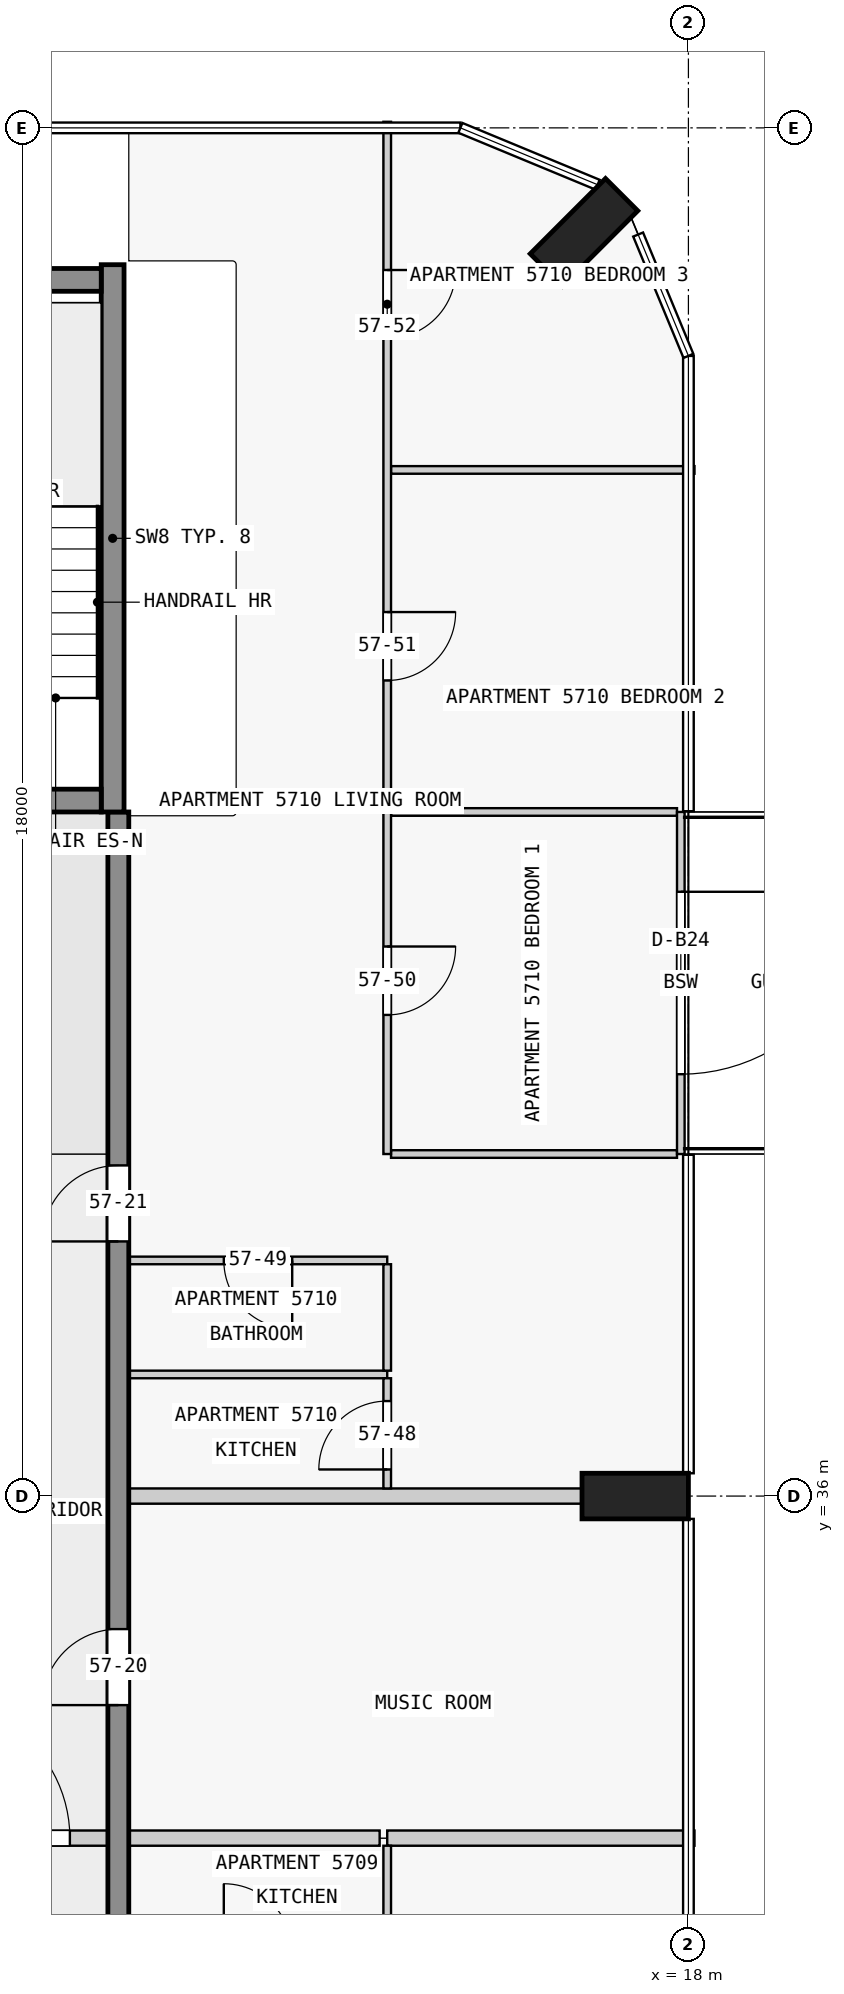
"""IFC4 building model, lengths in metres.
Left out: names, types, materials, properties, quantities, classifications, styles, units other than length and angle.
Written with IfcOpenShell. Run it as: python <this file> out.ifc"""

import sys

from ifc_helpers import new_model, si_unit, direction, frame, frame_2d, origin, origin_2d, place, context, subcontext, project, spatial, rectangle, extrude, element, fill, save


model = new_model("IFC4")
c1 = context("Model", 3, precision=1e-05, world=origin(), true_north=direction((0.0, 1.0)))
c2 = subcontext(c1, "Body", "Model", "MODEL_VIEW")
j1 = project(units=[si_unit("LENGTHUNIT", "METRE"), si_unit("PLANEANGLEUNIT", "RADIAN")], contexts=[c1])
p1 = place(None, origin())
s1 = spatial("IfcSite", under=j1, at=p1, CompositionType="ELEMENT")
p2 = place(p1, origin())
s2 = spatial("IfcBuilding", under=s1, at=p2, CompositionType="ELEMENT")
p3 = place(p2, frame((0.0, 0.0, 218.9)))
s3 = spatial("IfcBuildingStorey", under=s2, at=p3, CompositionType="ELEMENT", Elevation=218.9)
for number, where, z_axis, x_axis in (
    (1, (17.3, 36.0, 0.0), (0.0, 0.0, 1.0), (0.0, 1.0, 0.0)),
    (2, (16.626, 52.626, 0.0), (0.0, 0.0, 1.0), (-0.707, 0.707, 0.0)),
):
    element("IfcColumn", number, at=place(p3, frame(where, z_axis=z_axis, x_axis=x_axis)), inside=s3, PredefinedType="COLUMN", context=c2, shape_type="SweptSolid", body=[
        extrude(rectangle(XDim=0.6, YDim=1.4, at=origin_2d()), origin(), (0.0, 0.0, 1.0), 3.5),
    ])
p4 = place(p3, frame((7.725, 45.15, 0.0), z_axis=(0.0, 0.0, 1.0), x_axis=(1.0, 0.0, 0.0)))
e3 = element("IfcWall", 3, at=p4, inside=s3, PredefinedType="SHEAR", context=c2, shape_type="SweptSolid", body=[
    extrude(rectangle(XDim=2.55, YDim=0.3, at=frame_2d((1.275, 0.0))), origin(), (0.0, 0.0, 1.0), 3.5),
])
p5 = place(p4, frame((0.725, 0.0, 0.0)))
e4 = element("IfcOpeningElement", 4, at=p5, cuts=e3, PredefinedType="OPENING", context=c2, shape_type="SweptSolid", body=[
    extrude(rectangle(XDim=1.1, YDim=2.1, at=frame_2d((0.55, 1.05))), frame((0.0, 0.16, 0.0), z_axis=(0.0, -1.0, 0.0), x_axis=(1.0, 0.0, 0.0)), (0.0, 0.0, 1.0), 0.32),
])
p6 = place(p3, frame((7.725, 52.0, 0.0), z_axis=(0.0, 0.0, 1.0), x_axis=(1.0, 0.0, 0.0)))
e5 = element("IfcWall", 5, at=p6, inside=s3, PredefinedType="SHEAR", context=c2, shape_type="SweptSolid", body=[
    extrude(rectangle(XDim=2.55, YDim=0.3, at=frame_2d((1.275, 0.0))), origin(), (0.0, 0.0, 1.0), 3.5),
])
p7 = place(p3, frame((10.425, 45.0, 0.0), z_axis=(0.0, 0.0, 1.0), x_axis=(0.0, 1.0, 0.0)))
e6 = element("IfcWall", 6, at=p7, inside=s3, PredefinedType="SHEAR", context=c2, shape_type="SweptSolid", body=[
    extrude(rectangle(XDim=7.2, YDim=0.3, at=frame_2d((3.6, 0.0))), origin(), (0.0, 0.0, 1.0), 3.5),
])
p8 = place(p3, frame((10.5, 18.0, 0.0), z_axis=(0.0, 0.0, 1.0), x_axis=(0.0, 1.0, 0.0)))
e7 = element("IfcWall", 7, at=p8, inside=s3, PredefinedType="SHEAR", context=c2, shape_type="SweptSolid", body=[
    extrude(rectangle(XDim=27.0, YDim=0.275, at=frame_2d((13.5, 0.0))), origin(), (0.0, 0.0, 1.0), 3.25),
])
p9 = place(p8, frame((1.75, 0.0, 0.0)))
e8 = element("IfcOpeningElement", 8, at=p9, cuts=e7, PredefinedType="OPENING", context=c2, shape_type="SweptSolid", body=[
    extrude(rectangle(XDim=1.0, YDim=2.1, at=frame_2d((0.5, 1.05))), frame((0.0, 0.147, 0.0), z_axis=(0.0, -1.0, 0.0), x_axis=(1.0, 0.0, 0.0)), (0.0, 0.0, 1.0), 0.295),
])
p10 = place(p8, frame((6.25, 0.0, 0.0)))
e9 = element("IfcOpeningElement", 9, at=p10, cuts=e7, PredefinedType="OPENING", context=c2, shape_type="SweptSolid", body=[
    extrude(rectangle(XDim=1.0, YDim=2.1, at=frame_2d((0.5, 1.05))), frame((0.0, 0.147, 0.0), z_axis=(0.0, -1.0, 0.0), x_axis=(1.0, 0.0, 0.0)), (0.0, 0.0, 1.0), 0.295),
])
p11 = place(p8, frame((10.75, 0.0, 0.0)))
e10 = element("IfcOpeningElement", 10, at=p11, cuts=e7, PredefinedType="OPENING", context=c2, shape_type="SweptSolid", body=[
    extrude(rectangle(XDim=1.0, YDim=2.1, at=frame_2d((0.5, 1.05))), frame((0.0, 0.147, 0.0), z_axis=(0.0, -1.0, 0.0), x_axis=(1.0, 0.0, 0.0)), (0.0, 0.0, 1.0), 0.295),
])
p12 = place(p8, frame((15.25, 0.0, 0.0)))
e11 = element("IfcOpeningElement", 11, at=p12, cuts=e7, PredefinedType="OPENING", context=c2, shape_type="SweptSolid", body=[
    extrude(rectangle(XDim=1.0, YDim=2.1, at=frame_2d((0.5, 1.05))), frame((0.0, 0.147, 0.0), z_axis=(0.0, -1.0, 0.0), x_axis=(1.0, 0.0, 0.0)), (0.0, 0.0, 1.0), 0.295),
])
p13 = place(p8, frame((21.35, 0.0, 0.0)))
e12 = element("IfcOpeningElement", 12, at=p13, cuts=e7, PredefinedType="OPENING", context=c2, shape_type="SweptSolid", body=[
    extrude(rectangle(XDim=1.0, YDim=2.1, at=frame_2d((0.5, 1.05))), frame((0.0, 0.147, 0.0), z_axis=(0.0, -1.0, 0.0), x_axis=(1.0, 0.0, 0.0)), (0.0, 0.0, 1.0), 0.295),
])
p14 = place(p3, frame((17.9, 45.0, 0.0), z_axis=(0.0, 0.0, 1.0), x_axis=(0.0, -1.0, 0.0)))
e13 = element("IfcWall", 13, at=p14, inside=s3, PredefinedType="STANDARD", context=c2, shape_type="SweptSolid", body=[
    extrude(rectangle(XDim=4.5, YDim=0.1, at=frame_2d((2.25, 0.0))), origin(), (0.0, 0.0, 1.0), 3.25),
])
p15 = place(p14, frame((1.05, 0.0, 0.0)))
e14 = element("IfcOpeningElement", 14, at=p15, cuts=e13, PredefinedType="OPENING", context=c2, shape_type="SweptSolid", body=[
    extrude(rectangle(XDim=2.4, YDim=2.4, at=frame_2d((1.2, 1.2))), frame((0.0, 0.06, 0.0), z_axis=(0.0, -1.0, 0.0), x_axis=(1.0, 0.0, 0.0)), (0.0, 0.0, 1.0), 0.12),
])
p16 = place(p3, frame((13.938, 31.5, 0.0), z_axis=(0.0, 0.0, 1.0), x_axis=(-1.0, 0.0, 0.0)))
e15 = element("IfcWall", 15, at=p16, inside=s3, PredefinedType="PARTITIONING", context=c2, shape_type="SweptSolid", body=[
    extrude(rectangle(XDim=3.3, YDim=0.2, at=frame_2d((1.65, 0.0))), origin(), (0.0, 0.0, 1.0), 3.25),
])
p17 = place(p3, frame((14.038, 31.5, 0.0), z_axis=(0.0, 0.0, 1.0), x_axis=(1.0, 0.0, 0.0)))
e16 = element("IfcWall", 16, at=p17, inside=s3, PredefinedType="PARTITIONING", context=c2, shape_type="SweptSolid", body=[
    extrude(rectangle(XDim=4.042, YDim=0.2, at=frame_2d((2.021, 0.0))), origin(), (0.0, 0.0, 1.0), 3.25),
])
p18 = place(p3, frame((16.6, 36.0, 0.0), z_axis=(0.0, 0.0, 1.0), x_axis=(-1.0, 0.0, 0.0)))
e17 = element("IfcWall", 17, at=p18, inside=s3, PredefinedType="PARTITIONING", context=c2, shape_type="SweptSolid", body=[
    extrude(rectangle(XDim=5.963, YDim=0.2, at=frame_2d((2.981, 0.0))), origin(), (0.0, 0.0, 1.0), 3.25),
])
p19 = place(p3, frame((14.038, 37.6, 0.0), z_axis=(0.0, 0.0, 1.0), x_axis=(-1.0, 0.0, 0.0)))
e18 = element("IfcWall", 18, at=p19, inside=s3, PredefinedType="PARTITIONING", context=c2, shape_type="SweptSolid", body=[
    extrude(rectangle(XDim=3.4, YDim=0.1, at=frame_2d((1.7, 0.0))), origin(), (0.0, 0.0, 1.0), 3.25),
])
p20 = place(p3, frame((14.038, 39.1, 0.0), z_axis=(0.0, 0.0, 1.0), x_axis=(-1.0, 0.0, 0.0)))
e19 = element("IfcWall", 19, at=p20, inside=s3, PredefinedType="PARTITIONING", context=c2, shape_type="SweptSolid", body=[
    extrude(rectangle(XDim=3.4, YDim=0.1, at=frame_2d((1.7, 0.0))), origin(), (0.0, 0.0, 1.0), 3.25),
])
p21 = place(p20, frame((1.25, 0.0, 0.0)))
e20 = element("IfcOpeningElement", 20, at=p21, cuts=e19, PredefinedType="OPENING", context=c2, shape_type="SweptSolid", body=[
    extrude(rectangle(XDim=0.9, YDim=2.1, at=frame_2d((0.45, 1.05))), frame((0.0, 0.06, 0.0), z_axis=(0.0, -1.0, 0.0), x_axis=(1.0, 0.0, 0.0)), (0.0, 0.0, 1.0), 0.12),
])
for number, where, z_axis, x_axis in (
    (21, (14.087, 40.5, 0.0), (0.0, 0.0, 1.0), (1.0, 0.0, 0.0)),
    (22, (17.85, 45.0, 0.0), (0.0, 0.0, 1.0), (-1.0, 0.0, 0.0)),
):
    element("IfcWall", number, at=place(p3, frame(where, z_axis=z_axis, x_axis=x_axis)), inside=s3, PredefinedType="PARTITIONING", context=c2, shape_type="SweptSolid", body=[
        extrude(rectangle(XDim=3.763, YDim=0.1, at=frame_2d((1.881, 0.0))), origin(), (0.0, 0.0, 1.0), 3.25),
    ])
p22 = place(p3, frame((18.08, 49.5, 0.0), z_axis=(0.0, 0.0, 1.0), x_axis=(-1.0, 0.0, 0.0)))
e23 = element("IfcWall", 23, at=p22, inside=s3, PredefinedType="PARTITIONING", context=c2, shape_type="SweptSolid", body=[
    extrude(rectangle(XDim=3.993, YDim=0.1, at=frame_2d((1.996, 0.0))), origin(), (0.0, 0.0, 1.0), 3.25),
])
p23 = place(p3, frame((14.038, 54.08, 0.0), z_axis=(0.0, 0.0, 1.0), x_axis=(0.0, -1.0, 0.0)))
e24 = element("IfcWall", 24, at=p23, inside=s3, PredefinedType="PARTITIONING", context=c2, shape_type="SweptSolid", body=[
    extrude(rectangle(XDim=13.58, YDim=0.1, at=frame_2d((6.79, 0.0))), origin(), (0.0, 0.0, 1.0), 3.25),
])
p24 = place(p23, frame((10.85, 0.0, 0.0)))
e25 = element("IfcOpeningElement", 25, at=p24, cuts=e24, PredefinedType="OPENING", context=c2, shape_type="SweptSolid", body=[
    extrude(rectangle(XDim=0.9, YDim=2.1, at=frame_2d((0.45, 1.05))), frame((0.0, 0.06, 0.0), z_axis=(0.0, -1.0, 0.0), x_axis=(1.0, 0.0, 0.0)), (0.0, 0.0, 1.0), 0.12),
])
p25 = place(p23, frame((6.45, 0.0, 0.0)))
e26 = element("IfcOpeningElement", 26, at=p25, cuts=e24, PredefinedType="OPENING", context=c2, shape_type="SweptSolid", body=[
    extrude(rectangle(XDim=0.9, YDim=2.1, at=frame_2d((0.45, 1.05))), frame((0.0, 0.06, 0.0), z_axis=(0.0, -1.0, 0.0), x_axis=(1.0, 0.0, 0.0)), (0.0, 0.0, 1.0), 0.12),
])
p26 = place(p23, frame((1.95, 0.0, 0.0)))
e27 = element("IfcOpeningElement", 27, at=p26, cuts=e24, PredefinedType="OPENING", context=c2, shape_type="SweptSolid", body=[
    extrude(rectangle(XDim=0.9, YDim=2.1, at=frame_2d((0.45, 1.05))), frame((0.0, 0.06, 0.0), z_axis=(0.0, -1.0, 0.0), x_axis=(1.0, 0.0, 0.0)), (0.0, 0.0, 1.0), 0.12),
])
p27 = place(p3, frame((14.038, 30.05, 0.0), z_axis=(0.0, 0.0, 1.0), x_axis=(0.0, 1.0, 0.0)))
e28 = element("IfcWall", 28, at=p27, inside=s3, PredefinedType="PARTITIONING", context=c2, shape_type="SweptSolid", body=[
    extrude(rectangle(XDim=1.35, YDim=0.1, at=frame_2d((0.675, 0.0))), origin(), (0.0, 0.0, 1.0), 3.25),
])
p28 = place(p3, frame((14.038, 36.1, 0.0), z_axis=(0.0, 0.0, 1.0), x_axis=(0.0, 1.0, 0.0)))
e29 = element("IfcWall", 29, at=p28, inside=s3, PredefinedType="PARTITIONING", context=c2, shape_type="SweptSolid", body=[
    extrude(rectangle(XDim=1.45, YDim=0.1, at=frame_2d((0.725, 0.0))), origin(), (0.0, 0.0, 1.0), 3.25),
])
p29 = place(p28, frame((0.25, 0.0, 0.0)))
e30 = element("IfcOpeningElement", 30, at=p29, cuts=e29, PredefinedType="OPENING", context=c2, shape_type="SweptSolid", body=[
    extrude(rectangle(XDim=0.9, YDim=2.1, at=frame_2d((0.45, 1.05))), frame((0.0, 0.06, 0.0), z_axis=(0.0, -1.0, 0.0), x_axis=(1.0, 0.0, 0.0)), (0.0, 0.0, 1.0), 0.12),
])
p30 = place(p3, frame((14.038, 37.65, 0.0), z_axis=(0.0, 0.0, 1.0), x_axis=(0.0, 1.0, 0.0)))
e31 = element("IfcWall", 31, at=p30, inside=s3, PredefinedType="PARTITIONING", context=c2, shape_type="SweptSolid", body=[
    extrude(rectangle(XDim=1.4, YDim=0.1, at=frame_2d((0.7, 0.0))), origin(), (0.0, 0.0, 1.0), 3.25),
])
p31 = place(p3, frame((7.462, 31.5, 0.0), z_axis=(0.0, 0.0, 1.0), x_axis=(1.0, 0.0, 0.0)))
e32 = element("IfcWall", 32, at=p31, inside=s3, PredefinedType="PARTITIONING", context=c2, shape_type="SweptSolid", body=[
    extrude(rectangle(XDim=3.075, YDim=0.2, at=frame_2d((1.538, 0.0))), origin(), (0.0, 0.0, 1.0), 3.25),
])
p32 = place(p31, frame((0.6, 0.0, 0.0)))
e33 = element("IfcOpeningElement", 33, at=p32, cuts=e32, PredefinedType="OPENING", context=c2, shape_type="SweptSolid", body=[
    extrude(rectangle(XDim=1.8, YDim=2.1, at=frame_2d((0.9, 1.05))), frame((0.0, 0.11, 0.0), z_axis=(0.0, -1.0, 0.0), x_axis=(1.0, 0.0, 0.0)), (0.0, 0.0, 1.0), 0.22),
])
p33 = place(p15, origin())
e34 = element("IfcDoor", 34, at=p33, inside=s3, OperationType="SINGLE_SWING_LEFT", PredefinedType="DOOR", context=c2, shape_type="SweptSolid", body=[
    extrude(rectangle(XDim=2.4, YDim=2.4, at=frame_2d((1.2, 1.2))), frame((0.0, 0.025, 0.0), z_axis=(0.0, -1.0, 0.0), x_axis=(1.0, 0.0, 0.0)), (0.0, 0.0, 1.0), 0.05),
])
fill(e14, e34)
p34 = place(p12, origin())
e35 = element("IfcDoor", 35, at=p34, inside=s3, OperationType="SINGLE_SWING_RIGHT", PredefinedType="DOOR", context=c2, shape_type="SweptSolid", body=[
    extrude(rectangle(XDim=1.0, YDim=2.1, at=frame_2d((0.5, 1.05))), frame((0.0, 0.025, 0.0), z_axis=(0.0, -1.0, 0.0), x_axis=(1.0, 0.0, 0.0)), (0.0, 0.0, 1.0), 0.05),
])
fill(e11, e35)
p35 = place(p13, origin())
e36 = element("IfcDoor", 36, at=p35, inside=s3, OperationType="SINGLE_SWING_RIGHT", PredefinedType="DOOR", context=c2, shape_type="SweptSolid", body=[
    extrude(rectangle(XDim=1.0, YDim=2.1, at=frame_2d((0.5, 1.05))), frame((0.0, 0.025, 0.0), z_axis=(0.0, -1.0, 0.0), x_axis=(1.0, 0.0, 0.0)), (0.0, 0.0, 1.0), 0.05),
])
fill(e12, e36)
p36 = place(p32, origin())
e37 = element("IfcDoor", 37, at=p36, inside=s3, OperationType="SINGLE_SWING_LEFT", PredefinedType="DOOR", context=c2, shape_type="SweptSolid", body=[
    extrude(rectangle(XDim=1.8, YDim=2.1, at=frame_2d((0.9, 1.05))), frame((0.0, 0.025, 0.0), z_axis=(0.0, -1.0, 0.0), x_axis=(1.0, 0.0, 0.0)), (0.0, 0.0, 1.0), 0.05),
])
fill(e33, e37)
p37 = place(p29, origin())
e38 = element("IfcDoor", 38, at=p37, inside=s3, OperationType="SINGLE_SWING_LEFT", PredefinedType="DOOR", context=c2, shape_type="SweptSolid", body=[
    extrude(rectangle(XDim=0.9, YDim=2.1, at=frame_2d((0.45, 1.05))), frame((0.0, 0.025, 0.0), z_axis=(0.0, -1.0, 0.0), x_axis=(1.0, 0.0, 0.0)), (0.0, 0.0, 1.0), 0.05),
])
fill(e30, e38)
p38 = place(p21, origin())
e39 = element("IfcDoor", 39, at=p38, inside=s3, OperationType="SINGLE_SWING_LEFT", PredefinedType="DOOR", context=c2, shape_type="SweptSolid", body=[
    extrude(rectangle(XDim=0.9, YDim=2.1, at=frame_2d((0.45, 1.05))), frame((0.0, 0.025, 0.0), z_axis=(0.0, -1.0, 0.0), x_axis=(1.0, 0.0, 0.0)), (0.0, 0.0, 1.0), 0.05),
])
fill(e20, e39)
p39 = place(p24, origin())
e40 = element("IfcDoor", 40, at=p39, inside=s3, OperationType="SINGLE_SWING_RIGHT", PredefinedType="DOOR", context=c2, shape_type="SweptSolid", body=[
    extrude(rectangle(XDim=0.9, YDim=2.1, at=frame_2d((0.45, 1.05))), frame((0.0, 0.025, 0.0), z_axis=(0.0, -1.0, 0.0), x_axis=(1.0, 0.0, 0.0)), (0.0, 0.0, 1.0), 0.05),
])
fill(e25, e40)
p40 = place(p25, origin())
e41 = element("IfcDoor", 41, at=p40, inside=s3, OperationType="SINGLE_SWING_RIGHT", PredefinedType="DOOR", context=c2, shape_type="SweptSolid", body=[
    extrude(rectangle(XDim=0.9, YDim=2.1, at=frame_2d((0.45, 1.05))), frame((0.0, 0.025, 0.0), z_axis=(0.0, -1.0, 0.0), x_axis=(1.0, 0.0, 0.0)), (0.0, 0.0, 1.0), 0.05),
])
fill(e26, e41)
p41 = place(p26, origin())
e42 = element("IfcDoor", 42, at=p41, inside=s3, OperationType="SINGLE_SWING_LEFT", PredefinedType="DOOR", context=c2, shape_type="SweptSolid", body=[
    extrude(rectangle(XDim=0.9, YDim=2.1, at=frame_2d((0.45, 1.05))), frame((0.0, 0.025, 0.0), z_axis=(0.0, -1.0, 0.0), x_axis=(1.0, 0.0, 0.0)), (0.0, 0.0, 1.0), 0.05),
])
fill(e27, e42)
save(model, sys.argv[1])
